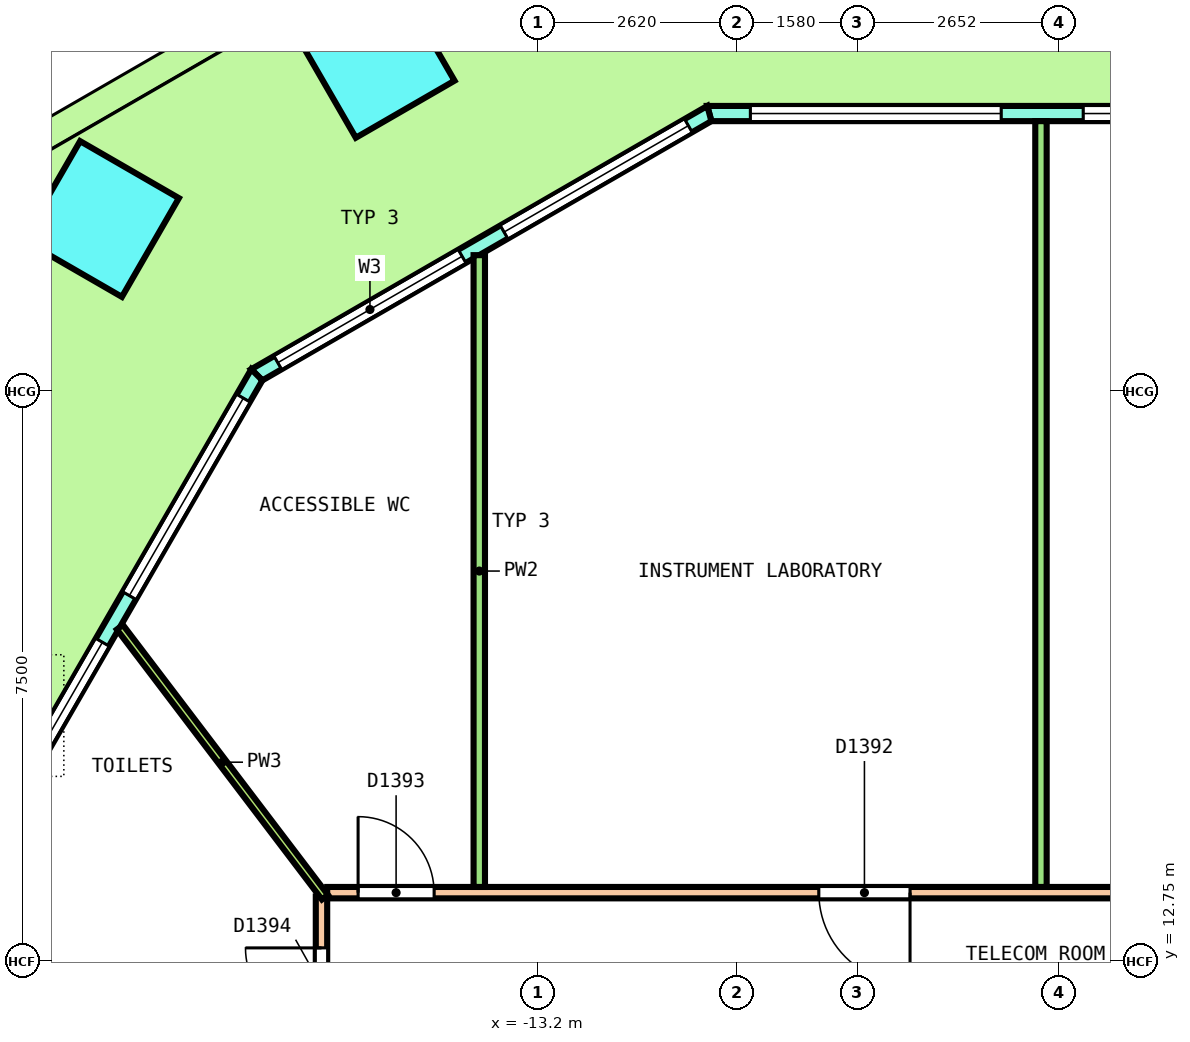
"""IFC4 building model, lengths in metres.
Left out: names, types, materials, properties, quantities, classifications, styles, units other than length and angle.
Written with IfcOpenShell. Run it as: python <this file> out.ifc"""

import sys

from ifc_helpers import new_model, si_unit, direction, frame, frame_2d, origin, origin_2d, place, context, subcontext, project, spatial, polyline, rectangle, outline, extrude, element, fill, save


model = new_model("IFC4")
c1 = context("Model", 3, precision=1e-05, world=origin(), true_north=direction((0.0, 1.0)))
c2 = subcontext(c1, "Body", "Model", "MODEL_VIEW")
j1 = project(units=[si_unit("LENGTHUNIT", "METRE"), si_unit("PLANEANGLEUNIT", "RADIAN")], contexts=[c1])
p1 = place(None, origin())
s1 = spatial("IfcSite", under=j1, at=p1, CompositionType="ELEMENT")
p2 = place(p1, origin())
s2 = spatial("IfcBuilding", under=s1, at=p2, CompositionType="ELEMENT")
p3 = place(p2, frame((0.0, 0.0, 45.4)))
s3 = spatial("IfcBuildingStorey", under=s2, at=p3, CompositionType="ELEMENT", Elevation=45.4)
for number, where, z_axis, x_axis in (
    (1, (-15.324, 24.606, 0.0), (-0.036, 0.0, 0.999), (-0.865, -0.5, -0.031)),
    (2, (-18.951, 22.512, 0.0), (-0.036, 0.0, 0.999), (-0.499, -0.866, -0.018)),
):
    element("IfcColumn", number, at=place(p3, frame(where, z_axis=z_axis, x_axis=x_axis)), inside=s3, PredefinedType="COLUMN", context=c2, shape_type="SweptSolid", body=[
        extrude(rectangle(XDim=1.5, YDim=1.5, at=origin_2d()), origin(), (0.0, 0.0, 1.0), 4.053),
    ])
p4 = place(p3, frame((10.947, 23.9, 0.0), z_axis=(0.0, 0.0, 1.0), x_axis=(-1.0, 0.0, 0.0)))
e3 = element("IfcWall", 3, at=p4, inside=s3, PredefinedType="SOLIDWALL", context=c2, shape_type="SweptSolid", body=[
    extrude(outline(polyline([(-0.027, -0.1), (1.018, -0.1), (2.063, -0.1), (3.109, -0.1), (4.154, -0.1), (5.199, -0.1), (6.244, -0.1), (7.289, -0.1), (8.334, -0.1), (9.38, -0.1), (10.425, -0.1), (11.47, -0.1), (12.515, -0.1), (13.56, -0.1), (14.605, -0.1), (15.65, -0.1), (16.696, -0.1), (17.741, -0.1), (18.786, -0.1), (19.831, -0.1), (20.876, -0.1), (21.921, -0.1), (21.868, 0.1), (20.828, 0.1), (19.788, 0.1), (18.748, 0.1), (17.708, 0.1), (16.667, 0.1), (15.627, 0.1), (14.587, 0.1), (13.547, 0.1), (12.507, 0.1), (11.467, 0.1), (10.427, 0.1), (9.387, 0.1), (8.347, 0.1), (7.307, 0.1), (6.267, 0.1), (5.227, 0.1), (4.187, 0.1), (3.147, 0.1), (2.107, 0.1), (1.067, 0.1), (0.027, 0.1), (-0.027, -0.1)])), origin(), (0.0, 0.0, 1.0), 4.1),
])
p5 = place(p4, frame((0.54, 0.0, 0.1)))
e4 = element("IfcOpeningElement", 4, at=p5, cuts=e3, PredefinedType="OPENING", context=c2, shape_type="SweptSolid", body=[
    extrude(rectangle(XDim=3.3, YDim=2.9, at=frame_2d((1.65, 1.45))), frame((0.0, 0.11, 0.0), z_axis=(0.0, -1.0, 0.0), x_axis=(1.0, 0.0, 0.0)), (0.0, 0.0, 1.0), 0.22),
])
p6 = place(p4, frame((4.918, 0.0, 0.1)))
e5 = element("IfcOpeningElement", 5, at=p6, cuts=e3, PredefinedType="OPENING", context=c2, shape_type="SweptSolid", body=[
    extrude(rectangle(XDim=3.3, YDim=2.9, at=frame_2d((1.65, 1.45))), frame((0.0, 0.11, 0.0), z_axis=(0.0, -1.0, 0.0), x_axis=(1.0, 0.0, 0.0)), (0.0, 0.0, 1.0), 0.22),
])
p7 = place(p4, frame((10.047, 0.0, 0.0)))
e6 = element("IfcOpeningElement", 6, at=p7, cuts=e3, PredefinedType="OPENING", context=c2, shape_type="SweptSolid", body=[
    extrude(rectangle(XDim=1.8, YDim=2.4, at=frame_2d((0.9, 1.2))), frame((0.0, 0.11, 0.0), z_axis=(0.0, -1.0, 0.0), x_axis=(1.0, 0.0, 0.0)), (0.0, 0.0, 1.0), 0.22),
])
p8 = place(p4, frame((10.047, 0.0, 2.55)))
e7 = element("IfcOpeningElement", 7, at=p8, cuts=e3, PredefinedType="OPENING", context=c2, shape_type="SweptSolid", body=[
    extrude(rectangle(XDim=1.8, YDim=0.45, at=frame_2d((0.9, 0.225))), frame((0.0, 0.11, 0.0), z_axis=(0.0, -1.0, 0.0), x_axis=(1.0, 0.0, 0.0)), (0.0, 0.0, 1.0), 0.22),
])
p9 = place(p4, frame((13.676, 0.0, 0.1)))
e8 = element("IfcOpeningElement", 8, at=p9, cuts=e3, PredefinedType="OPENING", context=c2, shape_type="SweptSolid", body=[
    extrude(rectangle(XDim=3.3, YDim=2.9, at=frame_2d((1.65, 1.45))), frame((0.0, 0.11, 0.0), z_axis=(0.0, -1.0, 0.0), x_axis=(1.0, 0.0, 0.0)), (0.0, 0.0, 1.0), 0.22),
])
p10 = place(p4, frame((18.055, 0.0, 0.1)))
e9 = element("IfcOpeningElement", 9, at=p10, cuts=e3, PredefinedType="OPENING", context=c2, shape_type="SweptSolid", body=[
    extrude(rectangle(XDim=3.3, YDim=2.9, at=frame_2d((1.65, 1.45))), frame((0.0, 0.11, 0.0), z_axis=(0.0, -1.0, 0.0), x_axis=(1.0, 0.0, 0.0)), (0.0, 0.0, 1.0), 0.22),
])
p11 = place(p3, frame((-10.947, 23.9, 0.0), z_axis=(0.0, 0.0, 1.0), x_axis=(-0.866029458321, -0.49999297727, 0.0)))
e10 = element("IfcWall", 10, at=p11, inside=s3, PredefinedType="SOLIDWALL", context=c2, shape_type="SweptSolid", body=[
    extrude(outline(polyline([(-0.027, -0.1), (1.128, -0.1), (2.282, -0.1), (3.437, -0.1), (4.592, -0.1), (5.747, -0.1), (6.901, -0.1), (6.848, 0.1), (5.711, 0.1), (4.574, 0.1), (3.437, 0.1), (2.301, 0.1), (1.164, 0.1), (0.027, 0.1), (-0.027, -0.1)])), origin(), (0.0, 0.0, 1.0), 4.1),
])
p12 = place(p11, frame((0.319, 0.0, 0.1)))
e11 = element("IfcOpeningElement", 11, at=p12, cuts=e10, PredefinedType="OPENING", context=c2, shape_type="SweptSolid", body=[
    extrude(rectangle(XDim=2.8, YDim=2.9, at=frame_2d((1.4, 1.45))), frame((0.0, 0.11, 0.0), z_axis=(0.0, -1.0, 0.0), x_axis=(1.0, 0.0, 0.0)), (0.0, 0.0, 1.0), 0.22),
])
p13 = place(p11, frame((3.756, 0.0, 0.1)))
e12 = element("IfcOpeningElement", 12, at=p13, cuts=e10, PredefinedType="OPENING", context=c2, shape_type="SweptSolid", body=[
    extrude(rectangle(XDim=2.8, YDim=2.9, at=frame_2d((1.4, 1.45))), frame((0.0, 0.11, 0.0), z_axis=(0.0, -1.0, 0.0), x_axis=(1.0, 0.0, 0.0)), (0.0, 0.0, 1.0), 0.22),
])
p14 = place(p3, frame((-16.901, 20.463, 0.0), z_axis=(0.0, 0.0, 1.0), x_axis=(-0.500000942564, -0.866024859594, 0.0)))
e13 = element("IfcWall", 13, at=p14, inside=s3, PredefinedType="SOLIDWALL", context=c2, shape_type="SweptSolid", body=[
    extrude(outline(polyline([(-0.027, -0.1), (1.006, -0.1), (2.039, -0.1), (3.072, -0.1), (4.105, -0.1), (5.138, -0.1), (6.172, -0.1), (7.205, -0.1), (8.238, -0.1), (9.271, -0.1), (10.304, -0.1), (11.337, -0.1), (12.37, -0.1), (13.403, -0.1), (14.436, -0.1), (15.469, -0.1), (16.502, -0.1), (17.535, -0.1), (18.568, -0.1), (18.515, 0.1), (17.488, 0.1), (16.46, 0.1), (15.433, 0.1), (14.406, 0.1), (13.379, 0.1), (12.352, 0.1), (11.325, 0.1), (10.298, 0.1), (9.271, 0.1), (8.244, 0.1), (7.217, 0.1), (6.189, 0.1), (5.162, 0.1), (4.135, 0.1), (3.108, 0.1), (2.081, 0.1), (1.054, 0.1), (0.027, 0.1), (-0.027, -0.1)])), origin(), (0.0, 0.0, 1.0), 4.1),
])
p15 = place(p14, frame((0.354, 0.0, 0.1)))
e14 = element("IfcOpeningElement", 14, at=p15, cuts=e13, PredefinedType="OPENING", context=c2, shape_type="SweptSolid", body=[
    extrude(rectangle(XDim=3.0, YDim=2.9, at=frame_2d((1.5, 1.45))), frame((0.0, 0.11, 0.0), z_axis=(0.0, -1.0, 0.0), x_axis=(1.0, 0.0, 0.0)), (0.0, 0.0, 1.0), 0.22),
])
p16 = place(p14, frame((4.062, 0.0, 0.1)))
e15 = element("IfcOpeningElement", 15, at=p16, cuts=e13, PredefinedType="OPENING", context=c2, shape_type="SweptSolid", body=[
    extrude(rectangle(XDim=3.0, YDim=2.9, at=frame_2d((1.5, 1.45))), frame((0.0, 0.11, 0.0), z_axis=(0.0, -1.0, 0.0), x_axis=(1.0, 0.0, 0.0)), (0.0, 0.0, 1.0), 0.22),
])
p17 = place(p14, frame((8.371, 0.0, 0.0)))
e16 = element("IfcOpeningElement", 16, at=p17, cuts=e13, PredefinedType="OPENING", context=c2, shape_type="SweptSolid", body=[
    extrude(rectangle(XDim=1.8, YDim=2.4, at=frame_2d((0.9, 1.2))), frame((0.0, 0.11, 0.0), z_axis=(0.0, -1.0, 0.0), x_axis=(1.0, 0.0, 0.0)), (0.0, 0.0, 1.0), 0.22),
])
p18 = place(p14, frame((8.371, 0.0, 2.55)))
e17 = element("IfcOpeningElement", 17, at=p18, cuts=e13, PredefinedType="OPENING", context=c2, shape_type="SweptSolid", body=[
    extrude(rectangle(XDim=1.8, YDim=0.45, at=frame_2d((0.9, 0.225))), frame((0.0, 0.11, 0.0), z_axis=(0.0, -1.0, 0.0), x_axis=(1.0, 0.0, 0.0)), (0.0, 0.0, 1.0), 0.22),
])
p19 = place(p14, frame((11.479, 0.0, 0.1)))
e18 = element("IfcOpeningElement", 18, at=p19, cuts=e13, PredefinedType="OPENING", context=c2, shape_type="SweptSolid", body=[
    extrude(rectangle(XDim=3.0, YDim=2.9, at=frame_2d((1.5, 1.45))), frame((0.0, 0.11, 0.0), z_axis=(0.0, -1.0, 0.0), x_axis=(1.0, 0.0, 0.0)), (0.0, 0.0, 1.0), 0.22),
])
p20 = place(p14, frame((15.188, 0.0, 0.1)))
e19 = element("IfcOpeningElement", 19, at=p20, cuts=e13, PredefinedType="OPENING", context=c2, shape_type="SweptSolid", body=[
    extrude(rectangle(XDim=3.0, YDim=2.9, at=frame_2d((1.5, 1.45))), frame((0.0, 0.11, 0.0), z_axis=(0.0, -1.0, 0.0), x_axis=(1.0, 0.0, 0.0)), (0.0, 0.0, 1.0), 0.22),
])
p21 = place(p3, frame((-15.975, 13.65, 0.0), z_axis=(0.0, 0.0, 1.0), x_axis=(1.0, 0.0, 0.0)))
e20 = element("IfcWall", 20, at=p21, inside=s3, PredefinedType="PARTITIONING", context=c2, shape_type="SweptSolid", body=[
    extrude(rectangle(XDim=31.95, YDim=0.15, at=frame_2d((15.975, 0.0))), origin(), (0.0, 0.0, 1.0), 3.05),
])
p22 = place(p21, frame((28.887, 0.0, 0.0)))
e21 = element("IfcOpeningElement", 21, at=p22, cuts=e20, PredefinedType="OPENING", context=c2, shape_type="SweptSolid", body=[
    extrude(rectangle(XDim=1.2, YDim=2.1, at=frame_2d((0.6, 1.05))), frame((0.0, 0.085, 0.0), z_axis=(0.0, -1.0, 0.0), x_axis=(1.0, 0.0, 0.0)), (0.0, 0.0, 1.0), 0.17),
])
p23 = place(p21, frame((13.655, 0.0, 0.0)))
e22 = element("IfcOpeningElement", 22, at=p23, cuts=e20, PredefinedType="OPENING", context=c2, shape_type="SweptSolid", body=[
    extrude(rectangle(XDim=1.2, YDim=2.1, at=frame_2d((0.6, 1.05))), frame((0.0, 0.085, 0.0), z_axis=(0.0, -1.0, 0.0), x_axis=(1.0, 0.0, 0.0)), (0.0, 0.0, 1.0), 0.17),
])
p24 = place(p21, frame((6.468, 0.0, 0.0)))
e23 = element("IfcOpeningElement", 23, at=p24, cuts=e20, PredefinedType="OPENING", context=c2, shape_type="SweptSolid", body=[
    extrude(rectangle(XDim=1.2, YDim=2.1, at=frame_2d((0.6, 1.05))), frame((0.0, 0.085, 0.0), z_axis=(0.0, -1.0, 0.0), x_axis=(1.0, 0.0, 0.0)), (0.0, 0.0, 1.0), 0.17),
])
p25 = place(p21, frame((0.406, 0.0, 0.0)))
e24 = element("IfcOpeningElement", 24, at=p25, cuts=e20, PredefinedType="OPENING", context=c2, shape_type="SweptSolid", body=[
    extrude(rectangle(XDim=1.0, YDim=2.1, at=frame_2d((0.5, 1.05))), frame((0.0, 0.085, 0.0), z_axis=(0.0, -1.0, 0.0), x_axis=(1.0, 0.0, 0.0)), (0.0, 0.0, 1.0), 0.17),
])
p26 = place(p3, frame((-16.05, -13.575, 0.0), z_axis=(0.0, 0.0, 1.0), x_axis=(0.0, 1.0, 0.0)))
e25 = element("IfcWall", 25, at=p26, inside=s3, PredefinedType="PARTITIONING", context=c2, shape_type="SweptSolid", body=[
    extrude(rectangle(XDim=27.175, YDim=0.15, at=frame_2d((13.587, 0.0))), origin(), (0.0, 0.0, 1.0), 3.05),
])
p27 = place(p26, frame((25.498, 0.0, 0.0)))
e26 = element("IfcOpeningElement", 26, at=p27, cuts=e25, PredefinedType="OPENING", context=c2, shape_type="SweptSolid", body=[
    extrude(rectangle(XDim=1.0, YDim=2.1, at=frame_2d((0.5, 1.05))), frame((0.0, 0.085, 0.0), z_axis=(0.0, -1.0, 0.0), x_axis=(1.0, 0.0, 0.0)), (0.0, 0.0, 1.0), 0.17),
])
p28 = place(p26, frame((18.884, 0.0, 0.0)))
e27 = element("IfcOpeningElement", 27, at=p28, cuts=e25, PredefinedType="OPENING", context=c2, shape_type="SweptSolid", body=[
    extrude(rectangle(XDim=1.2, YDim=2.1, at=frame_2d((0.6, 1.05))), frame((0.0, 0.085, 0.0), z_axis=(0.0, -1.0, 0.0), x_axis=(1.0, 0.0, 0.0)), (0.0, 0.0, 1.0), 0.17),
])
p29 = place(p26, frame((7.215, 0.0, 0.0)))
e28 = element("IfcOpeningElement", 28, at=p29, cuts=e25, PredefinedType="OPENING", context=c2, shape_type="SweptSolid", body=[
    extrude(rectangle(XDim=1.2, YDim=2.1, at=frame_2d((0.6, 1.05))), frame((0.0, 0.085, 0.0), z_axis=(0.0, -1.0, 0.0), x_axis=(1.0, 0.0, 0.0)), (0.0, 0.0, 1.0), 0.17),
])
p30 = place(p3, frame((-6.584, 13.725, 0.0), z_axis=(0.0, 0.0, 1.0), x_axis=(0.0, 1.0, 0.0)))
e29 = element("IfcWall", 29, at=p30, inside=s3, PredefinedType="PARTITIONING", context=c2, shape_type="SweptSolid", body=[
    extrude(rectangle(XDim=10.075, YDim=0.15, at=frame_2d((5.038, 0.0))), origin(), (0.0, 0.0, 1.0), 3.05),
])
p31 = place(p3, frame((-13.974, 13.725, 0.0), z_axis=(0.0, 0.0, 1.0), x_axis=(0.0, 1.0, 0.0)))
e30 = element("IfcWall", 30, at=p31, inside=s3, PredefinedType="PARTITIONING", context=c2, shape_type="SweptSolid", body=[
    extrude(rectangle(XDim=8.312, YDim=0.15, at=frame_2d((4.156, 0.0))), origin(), (0.0, 0.0, 1.0), 3.05),
])
p32 = place(p3, frame((-18.702, 17.142, 0.0), z_axis=(0.0, 0.0, 1.0), x_axis=(0.604832040572, -0.796353064098, 0.0)))
e31 = element("IfcWall", 31, at=p32, inside=s3, PredefinedType="PARTITIONING", context=c2, shape_type="SweptSolid", body=[
    extrude(rectangle(XDim=4.46, YDim=0.1, at=frame_2d((2.23, 0.0))), origin(), (0.0, 0.0, 1.0), 3.05),
])
p33 = place(p9, origin())
e32 = element("IfcWindow", 32, at=p33, inside=s3, PartitioningType="SINGLE_PANEL", PredefinedType="WINDOW", context=c2, shape_type="SweptSolid", body=[
    extrude(rectangle(XDim=3.3, YDim=2.9, at=frame_2d((1.65, 1.45))), frame((0.0, 0.03, 0.0), z_axis=(0.0, -1.0, 0.0), x_axis=(1.0, 0.0, 0.0)), (0.0, 0.0, 1.0), 0.06),
])
fill(e8, e32)
p34 = place(p10, origin())
e33 = element("IfcWindow", 33, at=p34, inside=s3, PartitioningType="SINGLE_PANEL", PredefinedType="WINDOW", context=c2, shape_type="SweptSolid", body=[
    extrude(rectangle(XDim=3.3, YDim=2.9, at=frame_2d((1.65, 1.45))), frame((0.0, 0.03, 0.0), z_axis=(0.0, -1.0, 0.0), x_axis=(1.0, 0.0, 0.0)), (0.0, 0.0, 1.0), 0.06),
])
fill(e9, e33)
p35 = place(p12, origin())
e34 = element("IfcWindow", 34, at=p35, inside=s3, PartitioningType="SINGLE_PANEL", PredefinedType="WINDOW", context=c2, shape_type="SweptSolid", body=[
    extrude(rectangle(XDim=2.8, YDim=2.9, at=frame_2d((1.4, 1.45))), frame((0.0, 0.03, 0.0), z_axis=(0.0, -1.0, 0.0), x_axis=(1.0, 0.0, 0.0)), (0.0, 0.0, 1.0), 0.06),
])
fill(e11, e34)
p36 = place(p13, origin())
e35 = element("IfcWindow", 35, at=p36, inside=s3, PartitioningType="SINGLE_PANEL", PredefinedType="WINDOW", context=c2, shape_type="SweptSolid", body=[
    extrude(rectangle(XDim=2.8, YDim=2.9, at=frame_2d((1.4, 1.45))), frame((0.0, 0.03, 0.0), z_axis=(0.0, -1.0, 0.0), x_axis=(1.0, 0.0, 0.0)), (0.0, 0.0, 1.0), 0.06),
])
fill(e12, e35)
p37 = place(p15, origin())
e36 = element("IfcWindow", 36, at=p37, inside=s3, PartitioningType="SINGLE_PANEL", PredefinedType="WINDOW", context=c2, shape_type="SweptSolid", body=[
    extrude(rectangle(XDim=3.0, YDim=2.9, at=frame_2d((1.5, 1.45))), frame((0.0, 0.03, 0.0), z_axis=(0.0, -1.0, 0.0), x_axis=(1.0, 0.0, 0.0)), (0.0, 0.0, 1.0), 0.06),
])
fill(e14, e36)
p38 = place(p16, origin())
e37 = element("IfcWindow", 37, at=p38, inside=s3, PartitioningType="SINGLE_PANEL", PredefinedType="WINDOW", context=c2, shape_type="SweptSolid", body=[
    extrude(rectangle(XDim=3.0, YDim=2.9, at=frame_2d((1.5, 1.45))), frame((0.0, 0.03, 0.0), z_axis=(0.0, -1.0, 0.0), x_axis=(1.0, 0.0, 0.0)), (0.0, 0.0, 1.0), 0.06),
])
fill(e15, e37)
p39 = place(p24, origin())
e38 = element("IfcDoor", 38, at=p39, inside=s3, OperationType="DOUBLE_DOOR_SINGLE_SWING", PredefinedType="DOOR", context=c2, shape_type="SweptSolid", body=[
    extrude(rectangle(XDim=1.2, YDim=2.1, at=frame_2d((0.6, 1.05))), frame((0.0, 0.025, 0.0), z_axis=(0.0, -1.0, 0.0), x_axis=(1.0, 0.0, 0.0)), (0.0, 0.0, 1.0), 0.05),
])
fill(e23, e38)
p40 = place(p25, origin())
e39 = element("IfcDoor", 39, at=p40, inside=s3, OperationType="SINGLE_SWING_LEFT", PredefinedType="DOOR", context=c2, shape_type="SweptSolid", body=[
    extrude(rectangle(XDim=1.0, YDim=2.1, at=frame_2d((0.5, 1.05))), frame((0.0, 0.025, 0.0), z_axis=(0.0, -1.0, 0.0), x_axis=(1.0, 0.0, 0.0)), (0.0, 0.0, 1.0), 0.05),
])
fill(e24, e39)
p41 = place(p27, origin())
e40 = element("IfcDoor", 40, at=p41, inside=s3, OperationType="SINGLE_SWING_RIGHT", PredefinedType="DOOR", context=c2, shape_type="SweptSolid", body=[
    extrude(rectangle(XDim=1.0, YDim=2.1, at=frame_2d((0.5, 1.05))), frame((0.0, 0.025, 0.0), z_axis=(0.0, -1.0, 0.0), x_axis=(1.0, 0.0, 0.0)), (0.0, 0.0, 1.0), 0.05),
])
fill(e26, e40)
save(model, sys.argv[1])
